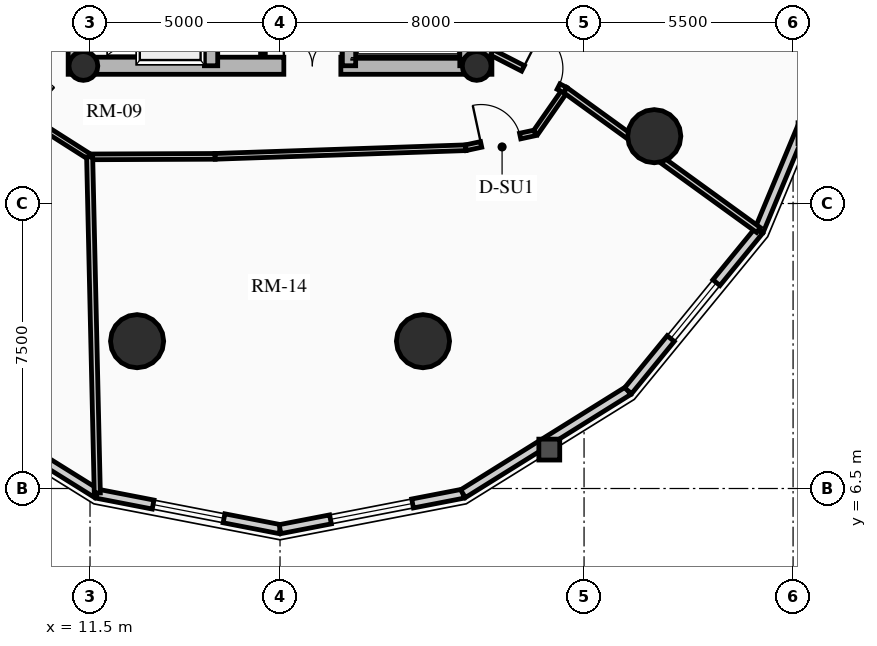
"""IFC4 building model, lengths in metres.
Left out: names, types, materials, properties, quantities, classifications, styles, units other than length and angle.
Written with IfcOpenShell. Run it as: python <this file> out.ifc"""

import sys

from ifc_helpers import new_model, si_unit, direction, frame, frame_2d, origin, origin_2d, place, context, subcontext, project, spatial, rectangle, circle, hollow_circle, extrude, source, transform, mapped, element, fill, save


model = new_model("IFC4")
c1 = context("Model", 3, precision=1e-05, world=origin(), true_north=direction((0.0, 1.0)))
c2 = subcontext(c1, "Body", "Model", "MODEL_VIEW")
j1 = project(units=[si_unit("LENGTHUNIT", "METRE"), si_unit("PLANEANGLEUNIT", "RADIAN")], contexts=[c1])
p1 = place(None, origin())
s1 = spatial("IfcSite", under=j1, at=p1, CompositionType="ELEMENT")
p2 = place(p1, origin())
s2 = spatial("IfcBuilding", under=s1, at=p2, CompositionType="ELEMENT")
p3 = place(p2, frame((0.0, 0.0, 132.88)))
s3 = spatial("IfcBuildingStorey", under=s2, at=p3, CompositionType="ELEMENT", Elevation=132.88)
for number, where, z_axis, x_axis in (
    (1, (11.15, 17.4, 0.0), (0.0, 0.0, 1.0), (0.0, 1.0, 0.0)),
    (2, (21.85, 17.4, 0.0), (0.0, 0.0, 1.0), (0.0, 1.0, 0.0)),
):
    element("IfcWall", number, at=place(p3, frame(where, z_axis=z_axis, x_axis=x_axis)), inside=s3, PredefinedType="SHEAR", context=c2, shape_type="SweptSolid", body=[
        extrude(rectangle(XDim=14.2, YDim=0.45, at=frame_2d((7.1, 0.0))), origin(), (0.0, 0.0, 1.0), 3.72),
    ])
p4 = place(p3, frame((11.15, 17.625, 0.0), z_axis=(0.0, 0.0, 1.0), x_axis=(1.0, 0.0, 0.0)))
e3 = element("IfcWall", 3, at=p4, inside=s3, PredefinedType="SHEAR", context=c2, shape_type="SweptSolid", body=[
    extrude(rectangle(XDim=10.7, YDim=0.45, at=frame_2d((5.35, 0.0))), origin(), (0.0, 0.0, 1.0), 3.72),
])
m1 = source(origin(), c2, "Body", "SweptSolid", [
    extrude(rectangle(XDim=1.5, YDim=2.02, at=frame_2d((0.75, 1.01))), frame((0.0, 0.235, 0.0), z_axis=(0.0, -1.0, 0.0), x_axis=(1.0, 0.0, 0.0)), (0.0, 0.0, 1.0), 0.47),
])
p5 = place(p4, frame((5.45, 0.0, 0.0)))
e4 = element("IfcOpeningElement", 4, at=p5, cuts=e3, PredefinedType="OPENING", context=c2, shape_type="MappedRepresentation", body=[
    mapped(m1, transform((0.0, 0.0, 0.0), x_axis=(1.0, 0.0, 0.0), y_axis=(0.0, 1.0, 0.0), z_axis=(0.0, 0.0, 1.0), scale=1.0)),
])
p6 = place(p3, frame((14.685, 17.625, 0.0), z_axis=(0.0, 0.0, 1.0), x_axis=(0.0, 1.0, 0.0)))
e5 = element("IfcWall", 5, at=p6, inside=s3, PredefinedType="SHEAR", context=c2, shape_type="SweptSolid", body=[
    extrude(rectangle(XDim=13.75, YDim=0.35, at=frame_2d((6.875, 0.0))), origin(), (0.0, 0.0, 1.0), 3.72),
])
m2 = source(origin(), c2, "Body", "SweptSolid", [
    extrude(rectangle(XDim=1.1, YDim=2.015, at=frame_2d((0.55, 1.007))), frame((0.0, 0.185, 0.0), z_axis=(0.0, -1.0, 0.0), x_axis=(1.0, 0.0, 0.0)), (0.0, 0.0, 1.0), 0.37),
])
p7 = place(p6, frame((4.875, 0.0, 0.0)))
e6 = element("IfcOpeningElement", 6, at=p7, cuts=e5, PredefinedType="OPENING", context=c2, shape_type="MappedRepresentation", body=[
    mapped(m2, transform((0.0, 0.0, 0.0), x_axis=(1.0, 0.0, 0.0), y_axis=(0.0, 1.0, 0.0), z_axis=(0.0, 0.0, 1.0), scale=1.0)),
])
p8 = place(p6, frame((0.65, 0.0, 0.0)))
e7 = element("IfcOpeningElement", 7, at=p8, cuts=e5, PredefinedType="OPENING", context=c2, shape_type="MappedRepresentation", body=[
    mapped(m2, transform((0.0, 0.0, 0.0), x_axis=(1.0, 0.0, 0.0), y_axis=(0.0, 1.0, 0.0), z_axis=(0.0, 0.0, 1.0), scale=1.0)),
])
p9 = place(p6, frame((2.65, 0.0, 0.0)))
e8 = element("IfcOpeningElement", 8, at=p9, cuts=e5, PredefinedType="OPENING", context=c2, shape_type="MappedRepresentation", body=[
    mapped(m2, transform((0.0, 0.0, 0.0), x_axis=(1.0, 0.0, 0.0), y_axis=(0.0, 1.0, 0.0), z_axis=(0.0, 0.0, 1.0), scale=1.0)),
])
m3 = source(origin(), c2, "Body", "SweptSolid", [
    extrude(rectangle(XDim=1.15, YDim=2.02, at=frame_2d((0.575, 1.01))), frame((0.0, 0.185, 0.0), z_axis=(0.0, -1.0, 0.0), x_axis=(1.0, 0.0, 0.0)), (0.0, 0.0, 1.0), 0.37),
])
p10 = place(p6, frame((7.295, 0.0, 0.0)))
e9 = element("IfcOpeningElement", 9, at=p10, cuts=e5, PredefinedType="OPENING", context=c2, shape_type="MappedRepresentation", body=[
    mapped(m3, transform((0.0, 0.0, 0.0), x_axis=(1.0, 0.0, 0.0), y_axis=(0.0, 1.0, 0.0), z_axis=(0.0, 0.0, 1.0), scale=1.0)),
])
p11 = place(p3, frame((18.315, 17.625, 0.0), z_axis=(0.0, 0.0, 1.0), x_axis=(0.0, 1.0, 0.0)))
e10 = element("IfcWall", 10, at=p11, inside=s3, PredefinedType="SHEAR", context=c2, shape_type="SweptSolid", body=[
    extrude(rectangle(XDim=13.75, YDim=0.35, at=frame_2d((6.875, 0.0))), origin(), (0.0, 0.0, 1.0), 3.72),
])
p12 = place(p11, frame((5.305, 0.0, 0.0)))
e11 = element("IfcOpeningElement", 11, at=p12, cuts=e10, PredefinedType="OPENING", context=c2, shape_type="MappedRepresentation", body=[
    mapped(m3, transform((0.0, 0.0, 0.0), x_axis=(1.0, 0.0, 0.0), y_axis=(0.0, 1.0, 0.0), z_axis=(0.0, 0.0, 1.0), scale=1.0)),
])
p13 = place(p3, frame((21.405, 17.625, 0.0), z_axis=(0.0, 0.0, 1.0), x_axis=(0.0, 1.0, 0.0)))
e12 = element("IfcWall", 12, at=p13, inside=s3, PredefinedType="SHEAR", context=c2, shape_type="SweptSolid", body=[
    extrude(rectangle(XDim=6.72, YDim=0.35, at=frame_2d((3.36, 0.0))), origin(), (0.0, 0.0, 1.0), 3.72),
])
for number, where, z_axis, x_axis in (
    (13, (11.325, 17.62, 0.0), (0.0, 0.0, 1.0), (1.0, 0.0, 0.0)),
    (14, (21.675, 17.62, 0.0), (0.0, 0.0, 1.0), (1.0, 0.0, 0.0)),
):
    element("IfcColumn", number, at=place(p3, frame(where, z_axis=z_axis, x_axis=x_axis)), inside=s3, PredefinedType="COLUMN", context=c2, shape_type="SweptSolid", body=[
        extrude(hollow_circle(Radius=0.38, WallThickness=0.032, at=origin_2d()), origin(), (0.0, 0.0, 1.0), 3.72),
    ])
for number, where, z_axis, x_axis in (
    (15, (12.739, 10.377, 0.0), (0.0, 0.0, 1.0), (1.0, 0.0, 0.0)),
    (16, (20.261, 10.377, 0.0), (0.0, 0.0, 1.0), (1.0, 0.0, 0.0)),
    (17, (26.347, 15.771, 0.0), (0.0, 0.0, 1.0), (1.0, 0.0, 0.0)),
):
    element("IfcColumn", number, at=place(p3, frame(where, z_axis=z_axis, x_axis=x_axis)), inside=s3, PredefinedType="USERDEFINED", context=c2, shape_type="SweptSolid", body=[
        extrude(circle(Radius=0.7, at=origin_2d()), origin(), (0.0, 0.0, 1.0), 3.72),
    ])
p14 = place(p3, frame((11.685, 6.363, 0.0), z_axis=(0.0, 0.0, 1.0), x_axis=(-0.848520380187, 0.529162701263, 0.0)))
e18 = element("IfcWall", 18, at=p14, inside=s3, PredefinedType="SOLIDWALL", context=c2, shape_type="SweptSolid", body=[
    extrude(rectangle(XDim=5.119, YDim=0.24, at=frame_2d((2.56, 0.0))), origin(), (0.0, 0.0, 1.0), 2.949),
])
m4 = source(origin(), c2, "Body", "SweptSolid", [
    extrude(rectangle(XDim=1.9, YDim=1.35, at=frame_2d((0.95, 0.675))), frame((0.0, 0.13, 0.0), z_axis=(0.0, -1.0, 0.0), x_axis=(1.0, 0.0, 0.0)), (0.0, 0.0, 1.0), 0.26),
])
p15 = place(p14, frame((1.609, 0.0, 0.65)))
e19 = element("IfcOpeningElement", 19, at=p15, cuts=e18, PredefinedType="OPENING", context=c2, shape_type="MappedRepresentation", body=[
    mapped(m4, transform((0.0, 0.0, 0.0), x_axis=(1.0, 0.0, 0.0), y_axis=(0.0, 1.0, 0.0), z_axis=(0.0, 0.0, 1.0), scale=1.0)),
])
p16 = place(p3, frame((16.5, 5.43, 0.0), z_axis=(0.0, 0.0, 1.0), x_axis=(-0.981723785992, 0.190311344954, 0.0)))
e20 = element("IfcWall", 20, at=p16, inside=s3, PredefinedType="SOLIDWALL", context=c2, shape_type="SweptSolid", body=[
    extrude(rectangle(XDim=4.904, YDim=0.24, at=frame_2d((2.452, 0.0))), origin(), (0.0, 0.0, 1.0), 2.949),
])
p17 = place(p16, frame((1.502, 0.0, 0.65)))
e21 = element("IfcOpeningElement", 21, at=p17, cuts=e20, PredefinedType="OPENING", context=c2, shape_type="MappedRepresentation", body=[
    mapped(m4, transform((0.0, 0.0, 0.0), x_axis=(1.0, 0.0, 0.0), y_axis=(0.0, 1.0, 0.0), z_axis=(0.0, 0.0, 1.0), scale=1.0)),
])
p18 = place(p3, frame((21.315, 6.363, 0.0), z_axis=(0.0, 0.0, 1.0), x_axis=(-0.981723785992, -0.190311344954, 0.0)))
e22 = element("IfcWall", 22, at=p18, inside=s3, PredefinedType="SOLIDWALL", context=c2, shape_type="SweptSolid", body=[
    extrude(rectangle(XDim=4.904, YDim=0.24, at=frame_2d((2.452, 0.0))), origin(), (0.0, 0.0, 1.0), 2.949),
])
m5 = source(origin(), c2, "Body", "SweptSolid", [
    extrude(rectangle(XDim=2.2, YDim=1.35, at=frame_2d((1.1, 0.675))), frame((0.0, 0.13, 0.0), z_axis=(0.0, -1.0, 0.0), x_axis=(1.0, 0.0, 0.0)), (0.0, 0.0, 1.0), 0.26),
])
p19 = place(p18, frame((1.352, 0.0, 0.65)))
e23 = element("IfcOpeningElement", 23, at=p19, cuts=e22, PredefinedType="OPENING", context=c2, shape_type="MappedRepresentation", body=[
    mapped(m5, transform((0.0, 0.0, 0.0), x_axis=(1.0, 0.0, 0.0), y_axis=(0.0, 1.0, 0.0), z_axis=(0.0, 0.0, 1.0), scale=1.0)),
])
p20 = place(p3, frame((25.658, 9.072, 0.0), z_axis=(0.0, 0.0, 1.0), x_axis=(-0.848520380187, -0.529162701263, 0.0)))
e24 = element("IfcWall", 24, at=p20, inside=s3, PredefinedType="SOLIDWALL", context=c2, shape_type="SweptSolid", body=[
    extrude(rectangle(XDim=5.119, YDim=0.24, at=frame_2d((2.56, 0.0))), origin(), (0.0, 0.0, 1.0), 2.949),
])
p21 = place(p3, frame((29.105, 13.291, 0.0), z_axis=(0.0, 0.0, 1.0), x_axis=(-0.632700781152, -0.77439635945, 0.0)))
e25 = element("IfcWall", 25, at=p21, inside=s3, PredefinedType="SOLIDWALL", context=c2, shape_type="SweptSolid", body=[
    extrude(rectangle(XDim=5.448, YDim=0.24, at=frame_2d((2.724, 0.0))), origin(), (0.0, 0.0, 1.0), 2.949),
])
p22 = place(p21, frame((1.774, 0.0, 0.65)))
e26 = element("IfcOpeningElement", 26, at=p22, cuts=e25, PredefinedType="OPENING", context=c2, shape_type="MappedRepresentation", body=[
    mapped(m4, transform((0.0, 0.0, 0.0), x_axis=(1.0, 0.0, 0.0), y_axis=(0.0, 1.0, 0.0), z_axis=(0.0, 0.0, 1.0), scale=1.0)),
])
p23 = place(p3, frame((31.318, 18.607, 0.0), z_axis=(0.0, 0.0, 1.0), x_axis=(-0.384344417632, -0.923189779317, 0.0)))
e27 = element("IfcWall", 27, at=p23, inside=s3, PredefinedType="SOLIDWALL", context=c2, shape_type="SweptSolid", body=[
    extrude(rectangle(XDim=5.758, YDim=0.24, at=frame_2d((2.879, 0.0))), origin(), (0.0, 0.0, 1.0), 2.949),
])
p24 = place(p3, frame((16.05, 17.92, 0.0), z_axis=(0.0, 0.0, 1.0), x_axis=(0.0, 1.0, 0.0)))
e28 = element("IfcWall", 28, at=p24, inside=s3, PredefinedType="PARTITIONING", context=c2, shape_type="SweptSolid", body=[
    extrude(rectangle(XDim=1.8, YDim=0.125, at=frame_2d((0.9, 0.0))), origin(), (0.0, 0.0, 1.0), 3.425),
])
m6 = source(origin(), c2, "Body", "SweptSolid", [
    extrude(rectangle(XDim=0.9, YDim=2.005, at=frame_2d((0.45, 1.002))), frame((0.0, 0.073, 0.0), z_axis=(0.0, -1.0, 0.0), x_axis=(1.0, 0.0, 0.0)), (0.0, 0.0, 1.0), 0.145),
])
p25 = place(p24, frame((0.42, 0.0, 0.0)))
e29 = element("IfcOpeningElement", 29, at=p25, cuts=e28, PredefinedType="OPENING", context=c2, shape_type="MappedRepresentation", body=[
    mapped(m6, transform((0.0, 0.0, 0.0), x_axis=(1.0, 0.0, 0.0), y_axis=(0.0, 1.0, 0.0), z_axis=(0.0, 0.0, 1.0), scale=1.0)),
])
p26 = place(p3, frame((10.156, 16.075, 0.0), z_axis=(0.0, 0.0, 1.0), x_axis=(0.843896624713, -0.536505812455, 0.0)))
e30 = element("IfcWall", 30, at=p26, inside=s3, PredefinedType="PARTITIONING", context=c2, shape_type="SweptSolid", body=[
    extrude(rectangle(XDim=1.581, YDim=0.15, at=frame_2d((0.791, 0.0))), origin(), (0.0, 0.0, 1.0), 2.995),
])
p27 = place(p3, frame((11.49, 15.227, 0.0), z_axis=(0.0, 0.0, 1.0), x_axis=(0.999991728046, 0.004067411998, 0.0)))
e31 = element("IfcWall", 31, at=p27, inside=s3, PredefinedType="PARTITIONING", context=c2, shape_type="SweptSolid", body=[
    extrude(rectangle(XDim=3.301, YDim=0.15, at=frame_2d((1.651, 0.0))), origin(), (0.0, 0.0, 1.0), 2.995),
])
p28 = place(p3, frame((14.792, 15.24, 0.0), z_axis=(0.0, 0.0, 1.0), x_axis=(0.999408106202, 0.034401122909, 0.0)))
e32 = element("IfcWall", 32, at=p28, inside=s3, PredefinedType="PARTITIONING", context=c2, shape_type="SweptSolid", body=[
    extrude(rectangle(XDim=6.6, YDim=0.15, at=frame_2d((3.3, 0.0))), origin(), (0.0, 0.0, 1.0), 2.995),
])
p29 = place(p3, frame((21.388, 15.468, 0.0), z_axis=(0.0, 0.0, 1.0), x_axis=(0.977672748596, 0.210133283069, 0.0)))
e33 = element("IfcWall", 33, at=p29, inside=s3, PredefinedType="PARTITIONING", context=c2, shape_type="SweptSolid", body=[
    extrude(rectangle(XDim=1.876, YDim=0.15, at=frame_2d((0.938, 0.0))), origin(), (0.0, 0.0, 1.0), 2.995),
])
m7 = source(origin(), c2, "Body", "SweptSolid", [
    extrude(rectangle(XDim=1.05, YDim=2.015, at=frame_2d((0.525, 1.007))), frame((0.0, 0.085, 0.0), z_axis=(0.0, -1.0, 0.0), x_axis=(1.0, 0.0, 0.0)), (0.0, 0.0, 1.0), 0.17),
])
p30 = place(p29, frame((0.413, 0.0, 0.0)))
e34 = element("IfcOpeningElement", 34, at=p30, cuts=e33, PredefinedType="OPENING", context=c2, shape_type="MappedRepresentation", body=[
    mapped(m7, transform((0.0, 0.0, 0.0), x_axis=(1.0, 0.0, 0.0), y_axis=(0.0, 1.0, 0.0), z_axis=(0.0, 0.0, 1.0), scale=1.0)),
])
p31 = place(p3, frame((23.222, 15.862, 0.0), z_axis=(0.0, 0.0, 1.0), x_axis=(0.571941738195, 0.820294244836, 0.0)))
e35 = element("IfcWall", 35, at=p31, inside=s3, PredefinedType="PARTITIONING", context=c2, shape_type="SweptSolid", body=[
    extrude(rectangle(XDim=1.369, YDim=0.15, at=frame_2d((0.685, 0.0))), origin(), (0.0, 0.0, 1.0), 2.995),
])
p32 = place(p3, frame((11.49, 15.227, 0.0), z_axis=(0.0, 0.0, 1.0), x_axis=(0.022711375682, -0.999742063442, 0.0)))
e36 = element("IfcWall", 36, at=p32, inside=s3, PredefinedType="PARTITIONING", context=c2, shape_type="SweptSolid", body=[
    extrude(rectangle(XDim=8.847, YDim=0.16, at=frame_2d((4.423, 0.0))), origin(), (0.0, 0.0, 1.0), 2.949),
])
p33 = place(p3, frame((24.006, 16.985, 0.0), z_axis=(0.0, 0.0, 1.0), x_axis=(0.809849730791, -0.586637378231, 0.0)))
e37 = element("IfcWall", 37, at=p33, inside=s3, PredefinedType="PARTITIONING", context=c2, shape_type="SweptSolid", body=[
    extrude(rectangle(XDim=6.277, YDim=0.16, at=frame_2d((3.139, 0.0))), origin(), (0.0, 0.0, 1.0), 2.949),
])
p34 = place(p3, frame((22.075, 17.975, 0.0), z_axis=(0.0, 0.0, 1.0), x_axis=(0.889835034782, -0.456282380632, 0.0)))
e38 = element("IfcWall", 38, at=p34, inside=s3, PredefinedType="PARTITIONING", context=c2, shape_type="SweptSolid", body=[
    extrude(rectangle(XDim=2.17, YDim=0.16, at=frame_2d((1.085, 0.0))), origin(), (0.0, 0.0, 1.0), 2.995),
])
m8 = source(origin(), c2, "Body", "SweptSolid", [
    extrude(rectangle(XDim=1.05, YDim=2.015, at=frame_2d((0.525, 1.007))), frame((0.0, 0.09, 0.0), z_axis=(0.0, -1.0, 0.0), x_axis=(1.0, 0.0, 0.0)), (0.0, 0.0, 1.0), 0.18),
])
p35 = place(p34, frame((0.92, 0.0, 0.0)))
e39 = element("IfcOpeningElement", 39, at=p35, cuts=e38, PredefinedType="OPENING", context=c2, shape_type="MappedRepresentation", body=[
    mapped(m8, transform((0.0, 0.0, 0.0), x_axis=(1.0, 0.0, 0.0), y_axis=(0.0, 1.0, 0.0), z_axis=(0.0, 0.0, 1.0), scale=1.0)),
])
m9 = source(origin(), c2, "Body", "SweptSolid", [
    extrude(rectangle(XDim=1.9, YDim=1.35, at=frame_2d((0.95, 0.675))), frame((0.0, 0.03, 0.0), z_axis=(0.0, -1.0, 0.0), x_axis=(1.0, 0.0, 0.0)), (0.0, 0.0, 1.0), 0.06),
])
p36 = place(p17, origin())
e40 = element("IfcWindow", 40, at=p36, inside=s3, PartitioningType="DOUBLE_PANEL_VERTICAL", PredefinedType="WINDOW", context=c2, shape_type="MappedRepresentation", body=[
    mapped(m9, transform((0.0, 0.0, 0.0), x_axis=(1.0, 0.0, 0.0), y_axis=(0.0, 1.0, 0.0), z_axis=(0.0, 0.0, 1.0), scale=1.0)),
])
fill(e21, e40)
m10 = source(origin(), c2, "Body", "SweptSolid", [
    extrude(rectangle(XDim=2.2, YDim=1.35, at=frame_2d((1.1, 0.675))), frame((0.0, 0.03, 0.0), z_axis=(0.0, -1.0, 0.0), x_axis=(1.0, 0.0, 0.0)), (0.0, 0.0, 1.0), 0.06),
])
p37 = place(p19, origin())
e41 = element("IfcWindow", 41, at=p37, inside=s3, PartitioningType="DOUBLE_PANEL_VERTICAL", PredefinedType="WINDOW", context=c2, shape_type="MappedRepresentation", body=[
    mapped(m10, transform((0.0, 0.0, 0.0), x_axis=(1.0, 0.0, 0.0), y_axis=(0.0, 1.0, 0.0), z_axis=(0.0, 0.0, 1.0), scale=1.0)),
])
fill(e23, e41)
p38 = place(p22, origin())
e42 = element("IfcWindow", 42, at=p38, inside=s3, PartitioningType="DOUBLE_PANEL_VERTICAL", PredefinedType="WINDOW", context=c2, shape_type="MappedRepresentation", body=[
    mapped(m9, transform((0.0, 0.0, 0.0), x_axis=(1.0, 0.0, 0.0), y_axis=(0.0, 1.0, 0.0), z_axis=(0.0, 0.0, 1.0), scale=1.0)),
])
fill(e26, e42)
m11 = source(origin(), c2, "Body", "SweptSolid", [
    extrude(rectangle(XDim=1.5, YDim=2.02, at=frame_2d((0.75, 1.01))), frame((0.0, 0.025, 0.0), z_axis=(0.0, -1.0, 0.0), x_axis=(1.0, 0.0, 0.0)), (0.0, 0.0, 1.0), 0.05),
])
p39 = place(p5, origin())
e43 = element("IfcDoor", 43, at=p39, inside=s3, OperationType="DOUBLE_DOOR_SINGLE_SWING", PredefinedType="DOOR", context=c2, shape_type="MappedRepresentation", body=[
    mapped(m11, transform((0.0, 0.0, 0.0), x_axis=(1.0, 0.0, 0.0), y_axis=(0.0, 1.0, 0.0), z_axis=(0.0, 0.0, 1.0), scale=1.0)),
])
fill(e4, e43)
m12 = source(origin(), c2, "Body", "SweptSolid", [
    extrude(rectangle(XDim=1.05, YDim=2.015, at=frame_2d((0.525, 1.007))), frame((0.0, 0.025, 0.0), z_axis=(0.0, -1.0, 0.0), x_axis=(1.0, 0.0, 0.0)), (0.0, 0.0, 1.0), 0.05),
])
p40 = place(p35, origin())
e44 = element("IfcDoor", 44, at=p40, inside=s3, OperationType="SINGLE_SWING_LEFT", PredefinedType="DOOR", context=c2, shape_type="MappedRepresentation", body=[
    mapped(m12, transform((0.0, 0.0, 0.0), x_axis=(1.0, 0.0, 0.0), y_axis=(0.0, 1.0, 0.0), z_axis=(0.0, 0.0, 1.0), scale=1.0)),
])
fill(e39, e44)
p41 = place(p30, origin())
e45 = element("IfcDoor", 45, at=p41, inside=s3, OperationType="SINGLE_SWING_LEFT", PredefinedType="DOOR", context=c2, shape_type="MappedRepresentation", body=[
    mapped(m12, transform((0.0, 0.0, 0.0), x_axis=(1.0, 0.0, 0.0), y_axis=(0.0, 1.0, 0.0), z_axis=(0.0, 0.0, 1.0), scale=1.0)),
])
fill(e34, e45)
save(model, sys.argv[1])
